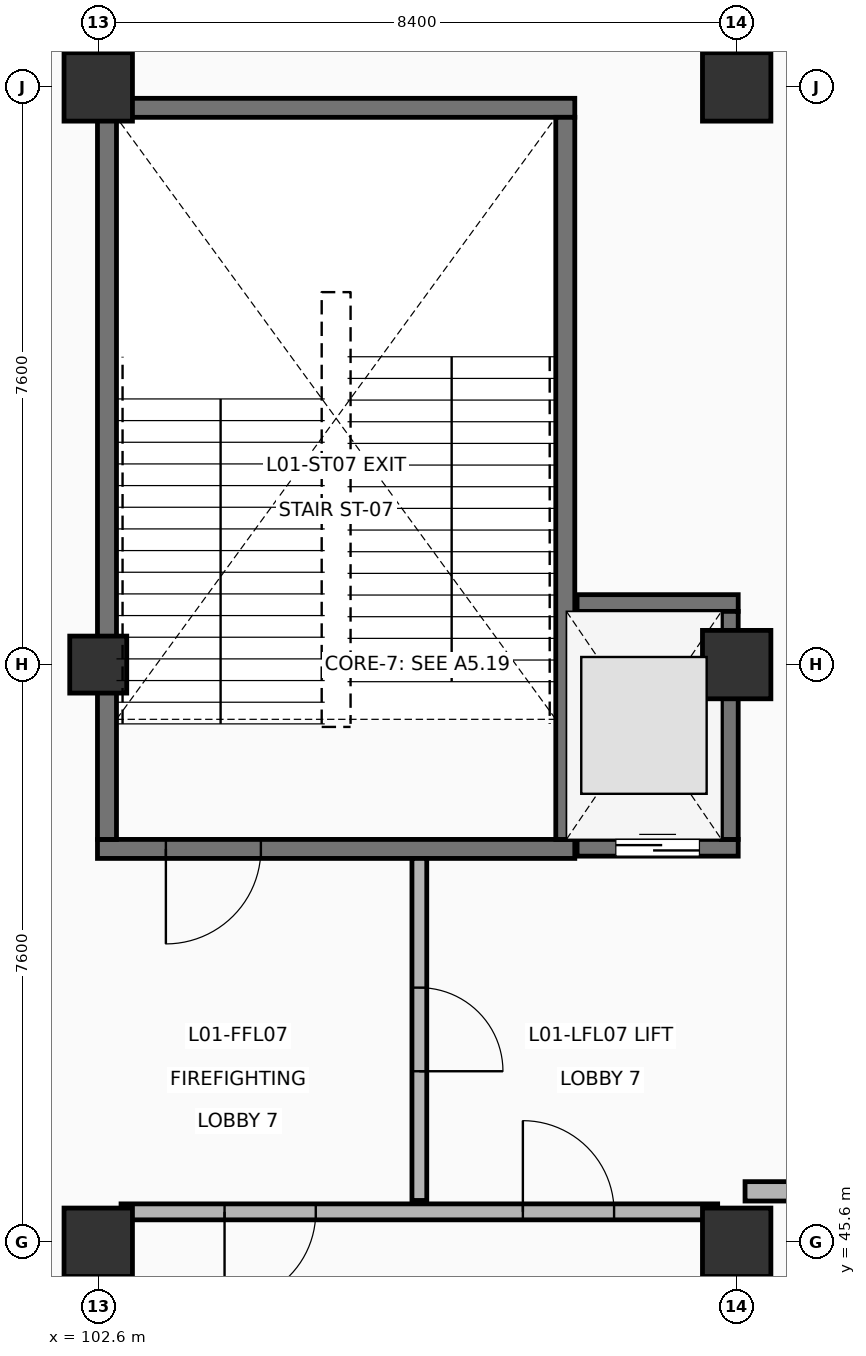
"""IFC4 building model, lengths in metres.
Left out: names, types, materials, properties, quantities, classifications, styles, units other than length and angle.
Written with IfcOpenShell. Run it as: python <this file> out.ifc"""

import sys

from ifc_helpers import new_model, si_unit, direction, frame, frame_2d, origin, origin_2d, place, context, subcontext, project, spatial, rectangle, circle, extrude, element, fill, save


model = new_model("IFC4")
c1 = context("Model", 3, precision=1e-05, world=origin(), true_north=direction((0.0, 1.0)))
c2 = subcontext(c1, "Body", "Model", "MODEL_VIEW")
j1 = project(units=[si_unit("LENGTHUNIT", "METRE"), si_unit("PLANEANGLEUNIT", "RADIAN")], contexts=[c1])
p1 = place(None, origin())
s1 = spatial("IfcSite", under=j1, at=p1, CompositionType="ELEMENT")
p2 = place(p1, origin())
s2 = spatial("IfcBuilding", under=s1, at=p2, CompositionType="ELEMENT")
p3 = place(p2, origin())
s3 = spatial("IfcBuildingStorey", under=s2, at=p3, CompositionType="ELEMENT", Elevation=0.0)
p4 = place(p3, frame((102.6, 45.6, 0.0), z_axis=(0.0, 0.0, 1.0), x_axis=(1.0, 0.0, 0.0)))
e1 = element("IfcColumn", 1, at=p4, inside=s3, PredefinedType="COLUMN", context=c2, shape_type="SweptSolid", body=[
    extrude(rectangle(XDim=0.9, YDim=0.9, at=origin_2d()), origin(), (0.0, 0.0, 1.0), 5.4),
])
p5 = place(p3, frame((102.6, 53.2, 0.0), z_axis=(0.0, 0.0, 1.0), x_axis=(1.0, 0.0, 0.0)))
e2 = element("IfcColumn", 2, at=p5, inside=s3, PredefinedType="COLUMN", context=c2, shape_type="SweptSolid", body=[
    extrude(circle(Radius=0.375, at=origin_2d()), origin(), (0.0, 0.0, 1.0), 5.4),
])
for number, where, z_axis, x_axis in (
    (3, (102.6, 60.8, 0.0), (0.0, 0.0, 1.0), (1.0, 0.0, 0.0)),
    (4, (111.0, 45.6, 0.0), (0.0, 0.0, 1.0), (1.0, 0.0, 0.0)),
    (5, (111.0, 53.2, 0.0), (0.0, 0.0, 1.0), (1.0, 0.0, 0.0)),
    (6, (111.0, 60.8, 0.0), (0.0, 0.0, 1.0), (1.0, 0.0, 0.0)),
):
    element("IfcColumn", number, at=place(p3, frame(where, z_axis=z_axis, x_axis=x_axis)), inside=s3, PredefinedType="COLUMN", context=c2, shape_type="SweptSolid", body=[
        extrude(rectangle(XDim=0.9, YDim=0.9, at=origin_2d()), origin(), (0.0, 0.0, 1.0), 5.4),
    ])
p6 = place(p3, frame((102.59, 50.775, 0.0), z_axis=(0.0, 0.0, 1.0), x_axis=(1.0, 0.0, 0.0)))
e7 = element("IfcWall", 7, at=p6, inside=s3, PredefinedType="SHEAR", context=c2, shape_type="SweptSolid", body=[
    extrude(rectangle(XDim=6.28, YDim=0.25, at=frame_2d((3.14, 0.0))), origin(), (0.0, 0.0, 1.0), 5.16),
])
p7 = place(p6, frame((0.9, 0.0, 0.0)))
e8 = element("IfcOpeningElement", 8, at=p7, cuts=e7, PredefinedType="OPENING", context=c2, shape_type="SweptSolid", body=[
    extrude(rectangle(XDim=1.25, YDim=2.2, at=frame_2d((0.625, 1.1))), frame((0.0, 0.135, 0.0), z_axis=(0.0, -1.0, 0.0), x_axis=(1.0, 0.0, 0.0)), (0.0, 0.0, 1.0), 0.27),
])
p8 = place(p3, frame((102.59, 60.525, 0.0), z_axis=(0.0, 0.0, 1.0), x_axis=(1.0, 0.0, 0.0)))
e9 = element("IfcWall", 9, at=p8, inside=s3, PredefinedType="SHEAR", context=c2, shape_type="SweptSolid", body=[
    extrude(rectangle(XDim=6.28, YDim=0.25, at=frame_2d((3.14, 0.0))), origin(), (0.0, 0.0, 1.0), 5.16),
])
for number, where, z_axis, x_axis in (
    (10, (102.715, 50.9, 0.0), (0.0, 0.0, 1.0), (0.0, 1.0, 0.0)),
    (11, (108.745, 50.9, 0.0), (0.0, 0.0, 1.0), (0.0, 1.0, 0.0)),
):
    element("IfcWall", number, at=place(p3, frame(where, z_axis=z_axis, x_axis=x_axis)), inside=s3, PredefinedType="SHEAR", context=c2, shape_type="SweptSolid", body=[
        extrude(rectangle(XDim=9.5, YDim=0.25, at=frame_2d((4.75, 0.0))), origin(), (0.0, 0.0, 1.0), 5.16),
    ])
p9 = place(p3, frame((108.9, 50.79, 0.0), z_axis=(0.0, 0.0, 1.0), x_axis=(1.0, 0.0, 0.0)))
e12 = element("IfcWall", 12, at=p9, inside=s3, PredefinedType="SHEAR", context=c2, shape_type="SweptSolid", body=[
    extrude(rectangle(XDim=2.12, YDim=0.22, at=frame_2d((1.06, 0.0))), origin(), (0.0, 0.0, 1.0), 5.16),
])
p10 = place(p9, frame((0.51, 0.0, 0.0)))
e13 = element("IfcOpeningElement", 13, at=p10, cuts=e12, PredefinedType="OPENING", context=c2, shape_type="SweptSolid", body=[
    extrude(rectangle(XDim=1.1, YDim=2.15, at=frame_2d((0.55, 1.075))), frame((0.0, 0.12, 0.0), z_axis=(0.0, -1.0, 0.0), x_axis=(1.0, 0.0, 0.0)), (0.0, 0.0, 1.0), 0.24),
])
p11 = place(p3, frame((108.9, 54.01, 0.0), z_axis=(0.0, 0.0, 1.0), x_axis=(1.0, 0.0, 0.0)))
e14 = element("IfcWall", 14, at=p11, inside=s3, PredefinedType="SHEAR", context=c2, shape_type="SweptSolid", body=[
    extrude(rectangle(XDim=2.12, YDim=0.22, at=frame_2d((1.06, 0.0))), origin(), (0.0, 0.0, 1.0), 5.16),
])
p12 = place(p3, frame((110.91, 50.9, 0.0), z_axis=(0.0, 0.0, 1.0), x_axis=(0.0, 1.0, 0.0)))
e15 = element("IfcWall", 15, at=p12, inside=s3, PredefinedType="SHEAR", context=c2, shape_type="SweptSolid", body=[
    extrude(rectangle(XDim=3.0, YDim=0.22, at=frame_2d((1.5, 0.0))), origin(), (0.0, 0.0, 1.0), 5.16),
])
p13 = place(p3, frame((102.9, 46.0, 0.0), z_axis=(0.0, 0.0, 1.0), x_axis=(1.0, 0.0, 0.0)))
e16 = element("IfcWall", 16, at=p13, inside=s3, PredefinedType="PARTITIONING", context=c2, shape_type="SweptSolid", body=[
    extrude(rectangle(XDim=7.85, YDim=0.21, at=frame_2d((3.925, 0.0))), origin(), (0.0, 0.0, 1.0), 5.16),
])
p14 = place(p13, frame((1.362, 0.0, 0.0)))
e17 = element("IfcOpeningElement", 17, at=p14, cuts=e16, PredefinedType="OPENING", context=c2, shape_type="SweptSolid", body=[
    extrude(rectangle(XDim=1.2, YDim=2.2, at=frame_2d((0.6, 1.1))), frame((0.0, 0.115, 0.0), z_axis=(0.0, -1.0, 0.0), x_axis=(1.0, 0.0, 0.0)), (0.0, 0.0, 1.0), 0.23),
])
p15 = place(p13, frame((5.287, 0.0, 0.0)))
e18 = element("IfcOpeningElement", 18, at=p15, cuts=e16, PredefinedType="OPENING", context=c2, shape_type="SweptSolid", body=[
    extrude(rectangle(XDim=1.2, YDim=2.2, at=frame_2d((0.6, 1.1))), frame((0.0, 0.115, 0.0), z_axis=(0.0, -1.0, 0.0), x_axis=(1.0, 0.0, 0.0)), (0.0, 0.0, 1.0), 0.23),
])
p16 = place(p3, frame((106.825, 46.15, 0.0), z_axis=(0.0, 0.0, 1.0), x_axis=(0.0, 1.0, 0.0)))
e19 = element("IfcWall", 19, at=p16, inside=s3, PredefinedType="PARTITIONING", context=c2, shape_type="SweptSolid", body=[
    extrude(rectangle(XDim=4.5, YDim=0.195, at=frame_2d((2.25, 0.0))), origin(), (0.0, 0.0, 1.0), 5.16),
])
p17 = place(p16, frame((1.7, 0.0, 0.0)))
e20 = element("IfcOpeningElement", 20, at=p17, cuts=e19, PredefinedType="OPENING", context=c2, shape_type="SweptSolid", body=[
    extrude(rectangle(XDim=1.1, YDim=2.15, at=frame_2d((0.55, 1.075))), frame((0.0, 0.107, 0.0), z_axis=(0.0, -1.0, 0.0), x_axis=(1.0, 0.0, 0.0)), (0.0, 0.0, 1.0), 0.215),
])
p18 = place(p3, frame((111.11, 46.27, 0.0), z_axis=(0.0, 0.0, 1.0), x_axis=(1.0, 0.0, 0.0)))
e21 = element("IfcWall", 21, at=p18, inside=s3, PredefinedType="PARTITIONING", context=c2, shape_type="SweptSolid", body=[
    extrude(rectangle(XDim=20.936, YDim=0.255, at=frame_2d((10.468, 0.0))), origin(), (0.0, 0.0, 1.0), 4.462),
])
p19 = place(p18, frame((9.668, 0.0, 0.0)))
e22 = element("IfcOpeningElement", 22, at=p19, cuts=e21, PredefinedType="OPENING", context=c2, shape_type="SweptSolid", body=[
    extrude(rectangle(XDim=1.6, YDim=2.35, at=frame_2d((0.8, 1.175))), frame((0.0, 0.137, 0.0), z_axis=(0.0, -1.0, 0.0), x_axis=(1.0, 0.0, 0.0)), (0.0, 0.0, 1.0), 0.275),
])
p20 = place(p7, origin())
e23 = element("IfcDoor", 23, at=p20, inside=s3, OperationType="SINGLE_SWING_RIGHT", PredefinedType="DOOR", context=c2, shape_type="SweptSolid", body=[
    extrude(rectangle(XDim=1.25, YDim=2.2, at=frame_2d((0.625, 1.1))), frame((0.0, 0.025, 0.0), z_axis=(0.0, -1.0, 0.0), x_axis=(1.0, 0.0, 0.0)), (0.0, 0.0, 1.0), 0.05),
])
fill(e8, e23)
p21 = place(p10, origin())
e24 = element("IfcDoor", 24, at=p21, inside=s3, OperationType="DOUBLE_DOOR_SLIDING", PredefinedType="DOOR", context=c2, shape_type="SweptSolid", body=[
    extrude(rectangle(XDim=1.1, YDim=2.15, at=frame_2d((0.55, 1.075))), frame((0.0, 0.025, 0.0), z_axis=(0.0, -1.0, 0.0), x_axis=(1.0, 0.0, 0.0)), (0.0, 0.0, 1.0), 0.05),
])
fill(e13, e24)
p22 = place(p14, origin())
e25 = element("IfcDoor", 25, at=p22, inside=s3, OperationType="SINGLE_SWING_RIGHT", PredefinedType="DOOR", context=c2, shape_type="SweptSolid", body=[
    extrude(rectangle(XDim=1.2, YDim=2.2, at=frame_2d((0.6, 1.1))), frame((0.0, 0.025, 0.0), z_axis=(0.0, -1.0, 0.0), x_axis=(1.0, 0.0, 0.0)), (0.0, 0.0, 1.0), 0.05),
])
fill(e17, e25)
p23 = place(p15, origin())
e26 = element("IfcDoor", 26, at=p23, inside=s3, OperationType="SINGLE_SWING_LEFT", PredefinedType="DOOR", context=c2, shape_type="SweptSolid", body=[
    extrude(rectangle(XDim=1.2, YDim=2.2, at=frame_2d((0.6, 1.1))), frame((0.0, 0.025, 0.0), z_axis=(0.0, -1.0, 0.0), x_axis=(1.0, 0.0, 0.0)), (0.0, 0.0, 1.0), 0.05),
])
fill(e18, e26)
p24 = place(p17, origin())
e27 = element("IfcDoor", 27, at=p24, inside=s3, OperationType="SINGLE_SWING_RIGHT", PredefinedType="DOOR", context=c2, shape_type="SweptSolid", body=[
    extrude(rectangle(XDim=1.1, YDim=2.15, at=frame_2d((0.55, 1.075))), frame((0.0, 0.025, 0.0), z_axis=(0.0, -1.0, 0.0), x_axis=(1.0, 0.0, 0.0)), (0.0, 0.0, 1.0), 0.05),
])
fill(e20, e27)
save(model, sys.argv[1])
